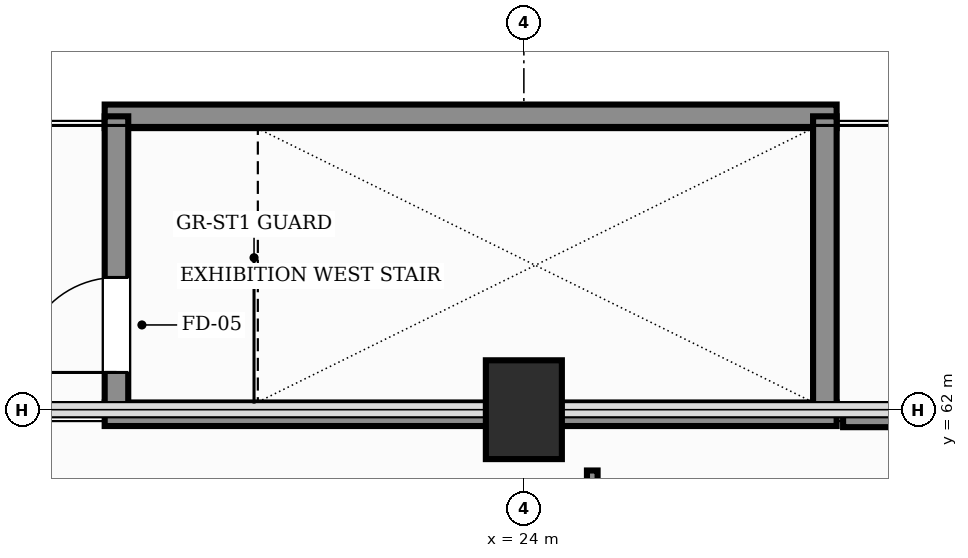
"""IFC4 building model, lengths in metres.
Left out: names, types, materials, properties, quantities, classifications, styles, units other than length and angle.
Written with IfcOpenShell. Run it as: python <this file> out.ifc"""

import sys

from ifc_helpers import new_model, si_unit, direction, frame, frame_2d, origin, origin_2d, place, context, subcontext, project, spatial, rectangle, extrude, element, fill, save


model = new_model("IFC4")
c1 = context("Model", 3, precision=1e-05, world=origin(), true_north=direction((0.0, 1.0)))
c2 = subcontext(c1, "Body", "Model", "MODEL_VIEW")
j1 = project(units=[si_unit("LENGTHUNIT", "METRE"), si_unit("PLANEANGLEUNIT", "RADIAN")], contexts=[c1])
p1 = place(None, origin())
s1 = spatial("IfcSite", under=j1, at=p1, CompositionType="ELEMENT")
p2 = place(p1, origin())
s2 = spatial("IfcBuilding", under=s1, at=p2, CompositionType="ELEMENT")
p3 = place(p2, frame((0.0, 0.0, 6.0)))
s3 = spatial("IfcBuildingStorey", under=s2, at=p3, CompositionType="ELEMENT", Elevation=6.0)
p4 = place(p3, frame((24.0, 62.0, 0.0), z_axis=(0.0, 0.0, 1.0), x_axis=(1.0, 0.0, 0.0)))
e1 = element("IfcColumn", 1, at=p4, inside=s3, PredefinedType="COLUMN", context=c2, shape_type="SweptSolid", body=[
    extrude(rectangle(XDim=1.0, YDim=1.3, at=origin_2d()), origin(), (0.0, 0.0, 1.0), 7.2),
])
for number, where, z_axis, x_axis in (
    (2, (18.485, 61.94, 0.0), (0.0, 0.0, 1.0), (1.0, 0.0, 0.0)),
    (3, (18.485, 65.86, 0.0), (0.0, 0.0, 1.0), (1.0, 0.0, 0.0)),
):
    element("IfcWall", number, at=place(p3, frame(where, z_axis=z_axis, x_axis=x_axis)), inside=s3, PredefinedType="SHEAR", context=c2, shape_type="SweptSolid", body=[
        extrude(rectangle(XDim=9.63, YDim=0.31, at=frame_2d((4.815, 0.0))), origin(), (0.0, 0.0, 1.0), 5.4),
    ])
p5 = place(p3, frame((18.64, 61.94, 0.0), z_axis=(0.0, 0.0, 1.0), x_axis=(0.0, 1.0, 0.0)))
e4 = element("IfcWall", 4, at=p5, inside=s3, PredefinedType="SHEAR", context=c2, shape_type="SweptSolid", body=[
    extrude(rectangle(XDim=3.92, YDim=0.31, at=frame_2d((1.96, 0.0))), origin(), (0.0, 0.0, 1.0), 5.4),
])
p6 = place(p5, frame((0.55, 0.0, 0.0)))
e5 = element("IfcOpeningElement", 5, at=p6, cuts=e4, PredefinedType="OPENING", context=c2, shape_type="SweptSolid", body=[
    extrude(rectangle(XDim=1.25, YDim=2.2, at=frame_2d((0.625, 1.1))), frame((0.0, 0.165, 0.0), z_axis=(0.0, -1.0, 0.0), x_axis=(1.0, 0.0, 0.0)), (0.0, 0.0, 1.0), 0.33),
])
p7 = place(p3, frame((27.96, 61.94, 0.0), z_axis=(0.0, 0.0, 1.0), x_axis=(0.0, 1.0, 0.0)))
e6 = element("IfcWall", 6, at=p7, inside=s3, PredefinedType="SHEAR", context=c2, shape_type="SweptSolid", body=[
    extrude(rectangle(XDim=3.92, YDim=0.31, at=frame_2d((1.96, 0.0))), origin(), (0.0, 0.0, 1.0), 5.4),
])
p8 = place(p3, frame((24.9, 36.2, 0.0), z_axis=(0.0, 0.0, 1.0), x_axis=(0.0, 1.0, 0.0)))
e7 = element("IfcWall", 7, at=p8, inside=s3, PredefinedType="PARTITIONING", context=c2, shape_type="SweptSolid", body=[
    extrude(rectangle(XDim=25.0, YDim=0.14, at=frame_2d((12.5, 0.0))), origin(), (0.0, 0.0, 1.0), 3.85),
])
p9 = place(p8, frame((6.5, 0.0, 0.0)))
e8 = element("IfcOpeningElement", 8, at=p9, cuts=e7, PredefinedType="OPENING", context=c2, shape_type="SweptSolid", body=[
    extrude(rectangle(XDim=0.9, YDim=2.15, at=frame_2d((0.45, 1.075))), frame((0.0, 0.08, 0.0), z_axis=(0.0, -1.0, 0.0), x_axis=(1.0, 0.0, 0.0)), (0.0, 0.0, 1.0), 0.16),
])
p10 = place(p3, frame((28.2, 61.9, 0.0), z_axis=(0.0, 0.0, 1.0), x_axis=(1.0, 0.0, 0.0)))
e9 = element("IfcWall", 9, at=p10, inside=s3, PredefinedType="SOLIDWALL", context=c2, shape_type="SweptSolid", body=[
    extrude(rectangle(XDim=3.3, YDim=0.26, at=frame_2d((1.65, 0.0))), origin(), (0.0, 0.0, 1.0), 5.4),
])
p11 = place(p10, frame((1.1, 0.0, 0.0)))
e10 = element("IfcOpeningElement", 10, at=p11, cuts=e9, PredefinedType="OPENING", context=c2, shape_type="SweptSolid", body=[
    extrude(rectangle(XDim=1.0, YDim=2.15, at=frame_2d((0.5, 1.075))), frame((0.0, 0.14, 0.0), z_axis=(0.0, -1.0, 0.0), x_axis=(1.0, 0.0, 0.0)), (0.0, 0.0, 1.0), 0.28),
])
p12 = place(p6, origin())
e11 = element("IfcDoor", 11, at=p12, inside=s3, OperationType="SINGLE_SWING_LEFT", PredefinedType="DOOR", context=c2, shape_type="SweptSolid", body=[
    extrude(rectangle(XDim=1.25, YDim=2.2, at=frame_2d((0.625, 1.1))), frame((0.0, 0.025, 0.0), z_axis=(0.0, -1.0, 0.0), x_axis=(1.0, 0.0, 0.0)), (0.0, 0.0, 1.0), 0.05),
])
fill(e5, e11)
save(model, sys.argv[1])
